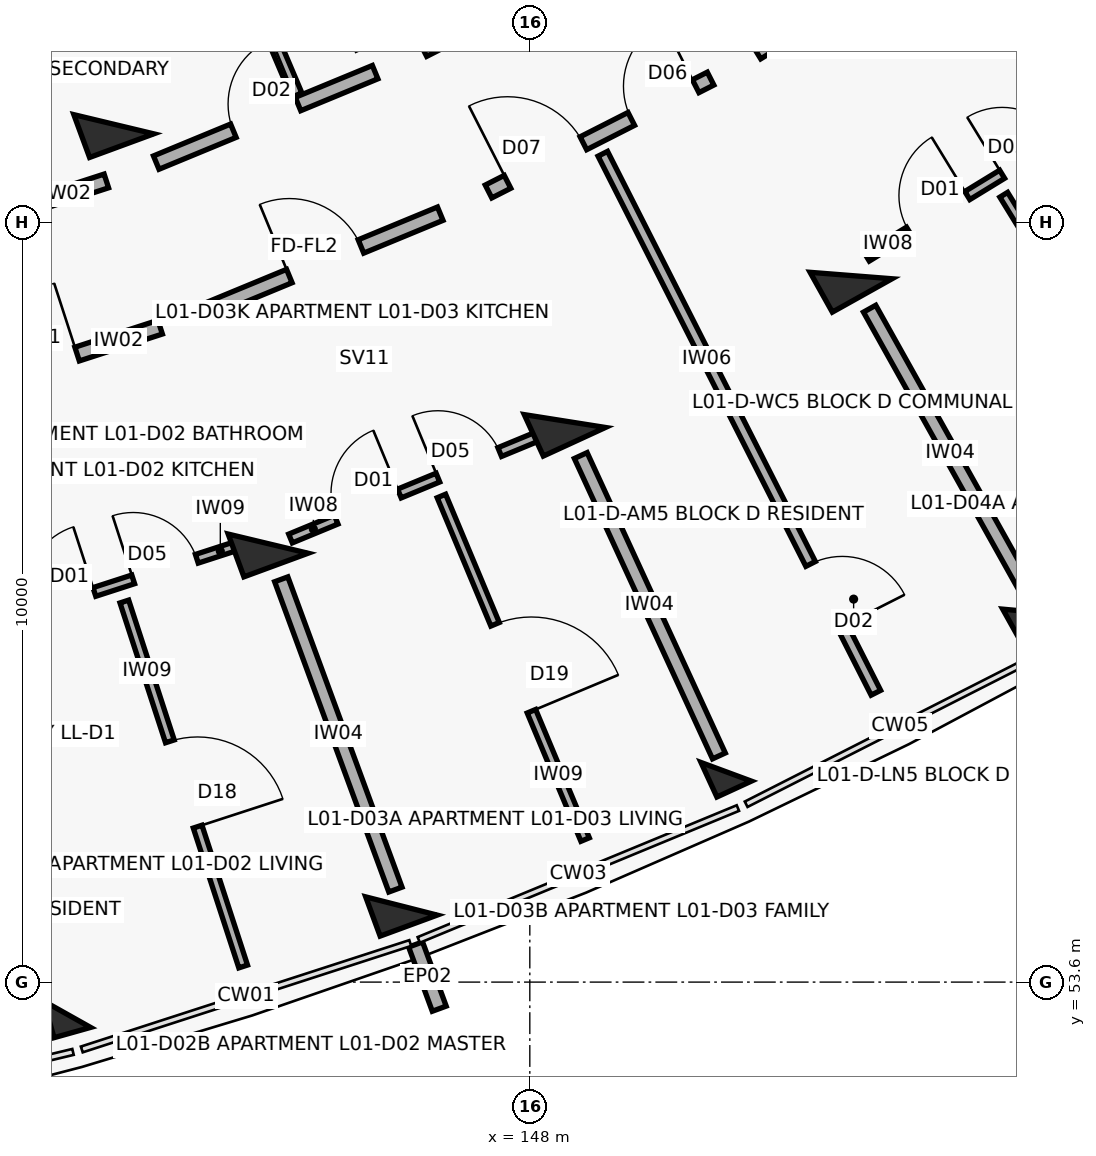
"""IFC4 building model, lengths in metres.
Left out: names, types, materials, properties, quantities, classifications, styles, units other than length and angle.
Written with IfcOpenShell. Run it as: python <this file> out.ifc"""

import sys

from ifc_helpers import new_model, si_unit, direction, frame, frame_2d, origin, origin_2d, place, context, subcontext, project, spatial, rectangle, extrude, element, fill, save


model = new_model("IFC4")
c1 = context("Model", 3, precision=1e-05, world=origin(), true_north=direction((0.0, 1.0)))
c2 = subcontext(c1, "Body", "Model", "MODEL_VIEW")
j1 = project(units=[si_unit("LENGTHUNIT", "METRE"), si_unit("PLANEANGLEUNIT", "RADIAN")], contexts=[c1])
p1 = place(None, origin())
s1 = spatial("IfcSite", under=j1, at=p1, CompositionType="ELEMENT")
p2 = place(p1, origin())
s2 = spatial("IfcBuilding", under=s1, at=p2, CompositionType="ELEMENT")
p3 = place(p2, frame((0.0, 0.0, 4.5)))
s3 = spatial("IfcBuildingStorey", under=s2, at=p3, CompositionType="ELEMENT", Elevation=4.5)
p4 = place(p3, frame((141.913, 53.177, 0.0), z_axis=(0.0, 0.0, 1.0), x_axis=(0.270600445976, -0.962691746426, 0.0)))
e1 = element("IfcColumn", 1, at=p4, inside=s3, PredefinedType="COLUMN", context=c2, shape_type="SweptSolid", body=[
    extrude(rectangle(XDim=0.5, YDim=0.5, at=origin_2d()), origin(), (0.0, 0.0, 1.0), 3.6),
])
for number, where, z_axis, x_axis in (
    (2, (142.527, 64.887, 0.0), (0.0, 0.0, 1.0), (0.345, -0.938, 0.0)),
    (3, (144.557, 59.369, 0.0), (0.0, 0.0, 1.0), (0.345, -0.938, 0.0)),
):
    element("IfcColumn", number, at=place(p3, frame(where, z_axis=z_axis, x_axis=x_axis)), inside=s3, PredefinedType="COLUMN", context=c2, shape_type="SweptSolid", body=[
        extrude(rectangle(XDim=0.6, YDim=0.9, at=origin_2d()), origin(), (0.0, 0.0, 1.0), 3.6),
    ])
p5 = place(p3, frame((146.311, 54.602, 0.0), z_axis=(0.0, 0.0, 1.0), x_axis=(0.345298198999, -0.93849302276, 0.0)))
e4 = element("IfcColumn", 4, at=p5, inside=s3, PredefinedType="COLUMN", context=c2, shape_type="SweptSolid", body=[
    extrude(rectangle(XDim=0.55, YDim=0.8, at=origin_2d()), origin(), (0.0, 0.0, 1.0), 3.6),
])
p6 = place(p3, frame((148.461, 60.982, 0.0), z_axis=(0.0, 0.0, 1.0), x_axis=(0.417867073801, -0.908508177527, 0.0)))
e5 = element("IfcColumn", 5, at=p6, inside=s3, PredefinedType="COLUMN", context=c2, shape_type="SweptSolid", body=[
    extrude(rectangle(XDim=0.6, YDim=0.9, at=origin_2d()), origin(), (0.0, 0.0, 1.0), 3.6),
])
p7 = place(p3, frame((150.584, 56.367, 0.0), z_axis=(0.0, 0.0, 1.0), x_axis=(0.417867073801, -0.908508177527, 0.0)))
e6 = element("IfcColumn", 6, at=p7, inside=s3, PredefinedType="COLUMN", context=c2, shape_type="SweptSolid", body=[
    extrude(rectangle(XDim=0.5, YDim=0.5, at=origin_2d()), origin(), (0.0, 0.0, 1.0), 3.6),
])
p8 = place(p3, frame((152.227, 62.897, 0.0), z_axis=(0.0, 0.0, 1.0), x_axis=(0.487859659139, -0.87292207727, 0.0)))
e7 = element("IfcColumn", 7, at=p8, inside=s3, PredefinedType="COLUMN", context=c2, shape_type="SweptSolid", body=[
    extrude(rectangle(XDim=0.6, YDim=0.9, at=origin_2d()), origin(), (0.0, 0.0, 1.0), 3.6),
])
p9 = place(p3, frame((154.705, 58.462, 0.0), z_axis=(0.0, 0.0, 1.0), x_axis=(0.487859659139, -0.87292207727, 0.0)))
e8 = element("IfcColumn", 8, at=p9, inside=s3, PredefinedType="COLUMN", context=c2, shape_type="SweptSolid", body=[
    extrude(rectangle(XDim=0.55, YDim=0.8, at=origin_2d()), origin(), (0.0, 0.0, 1.0), 3.6),
])
p10 = place(p3, frame((146.498, 54.095, 0.0), z_axis=(0.0, 0.0, 1.0), x_axis=(0.34529052391, -0.938495846607, 0.0)))
e9 = element("IfcWall", 9, at=p10, inside=s3, PredefinedType="PARAPET", context=c2, shape_type="SweptSolid", body=[
    extrude(rectangle(XDim=0.9, YDim=0.195, at=frame_2d((0.45, 0.0))), origin(), (0.0, 0.0, 1.0), 2.6),
])
p11 = place(p3, frame((140.019, 61.208, 0.0), z_axis=(0.0, 0.0, 1.0), x_axis=(0.951323803878, 0.308193154005, 0.0)))
e10 = element("IfcWall", 10, at=p11, inside=s3, PredefinedType="SOLIDWALL", context=c2, shape_type="SweptSolid", body=[
    extrude(rectangle(XDim=3.277, YDim=0.19, at=frame_2d((1.639, 0.0))), origin(), (0.0, 0.0, 1.0), 2.58),
])
p12 = place(p11, frame((1.148, 0.0, 0.0)))
e11 = element("IfcOpeningElement", 11, at=p12, cuts=e10, PredefinedType="OPENING", context=c2, shape_type="SweptSolid", body=[
    extrude(rectangle(XDim=0.98, YDim=2.15, at=frame_2d((0.49, 1.075))), frame((0.0, 0.105, 0.0), z_axis=(0.0, -1.0, 0.0), x_axis=(1.0, 0.0, 0.0)), (0.0, 0.0, 1.0), 0.21),
])
p13 = place(p3, frame((139.464, 63.181, 0.0), z_axis=(0.0, 0.0, 1.0), x_axis=(0.951336474448, 0.308154040027, 0.0)))
e12 = element("IfcWall", 12, at=p13, inside=s3, PredefinedType="SOLIDWALL", context=c2, shape_type="SweptSolid", body=[
    extrude(rectangle(XDim=3.116, YDim=0.19, at=frame_2d((1.558, 0.0))), origin(), (0.0, 0.0, 1.0), 2.58),
])
p14 = place(p13, frame((1.108, 0.0, 0.0)))
e13 = element("IfcOpeningElement", 13, at=p14, cuts=e12, PredefinedType="OPENING", context=c2, shape_type="SweptSolid", body=[
    extrude(rectangle(XDim=0.9, YDim=2.1, at=frame_2d((0.45, 1.05))), frame((0.0, 0.105, 0.0), z_axis=(0.0, -1.0, 0.0), x_axis=(1.0, 0.0, 0.0)), (0.0, 0.0, 1.0), 0.21),
])
p15 = place(p3, frame((140.797, 58.256, 0.0), z_axis=(0.0, 0.0, 1.0), x_axis=(0.951329312261, 0.308176150331, 0.0)))
e14 = element("IfcWall", 14, at=p15, inside=s3, PredefinedType="PARTITIONING", context=c2, shape_type="SweptSolid", body=[
    extrude(rectangle(XDim=3.616, YDim=0.12, at=frame_2d((1.808, 0.0))), origin(), (0.0, 0.0, 1.0), 2.58),
])
p16 = place(p15, frame((0.65, 0.0, 0.0)))
e15 = element("IfcOpeningElement", 15, at=p16, cuts=e14, PredefinedType="OPENING", context=c2, shape_type="SweptSolid", body=[
    extrude(rectangle(XDim=0.9, YDim=2.1, at=frame_2d((0.45, 1.05))), frame((0.0, 0.07, 0.0), z_axis=(0.0, -1.0, 0.0), x_axis=(1.0, 0.0, 0.0)), (0.0, 0.0, 1.0), 0.14),
])
p17 = place(p15, frame((2.086, 0.0, 0.0)))
e16 = element("IfcOpeningElement", 16, at=p17, cuts=e14, PredefinedType="OPENING", context=c2, shape_type="SweptSolid", body=[
    extrude(rectangle(XDim=0.88, YDim=2.1, at=frame_2d((0.44, 1.05))), frame((0.0, 0.07, 0.0), z_axis=(0.0, -1.0, 0.0), x_axis=(1.0, 0.0, 0.0)), (0.0, 0.0, 1.0), 0.14),
])
p18 = place(p3, frame((142.665, 58.608, 0.0), z_axis=(0.0, 0.0, 1.0), x_axis=(0.309592146544, -0.950869445717, 0.0)))
e17 = element("IfcWall", 17, at=p18, inside=s3, PredefinedType="PARTITIONING", context=c2, shape_type="SweptSolid", body=[
    extrude(rectangle(XDim=5.05, YDim=0.12, at=frame_2d((2.525, 0.0))), origin(), (0.0, 0.0, 1.0), 2.58),
])
p19 = place(p18, frame((1.935, 0.0, 0.0)))
e18 = element("IfcOpeningElement", 18, at=p19, cuts=e17, PredefinedType="OPENING", context=c2, shape_type="SweptSolid", body=[
    extrude(rectangle(XDim=1.18, YDim=2.1, at=frame_2d((0.59, 1.05))), frame((0.0, 0.07, 0.0), z_axis=(0.0, -1.0, 0.0), x_axis=(1.0, 0.0, 0.0)), (0.0, 0.0, 1.0), 0.14),
])
p20 = place(p3, frame((143.793, 62.459, 0.0), z_axis=(0.0, 0.0, 1.0), x_axis=(0.924214561665, 0.381873596896, 0.0)))
e19 = element("IfcWall", 19, at=p20, inside=s3, PredefinedType="SOLIDWALL", context=c2, shape_type="SweptSolid", body=[
    extrude(rectangle(XDim=3.277, YDim=0.19, at=frame_2d((1.639, 0.0))), origin(), (0.0, 0.0, 1.0), 2.58),
])
p21 = place(p20, frame((1.128, 0.0, 0.0)))
e20 = element("IfcOpeningElement", 20, at=p21, cuts=e19, PredefinedType="OPENING", context=c2, shape_type="SweptSolid", body=[
    extrude(rectangle(XDim=1.02, YDim=2.15, at=frame_2d((0.51, 1.075))), frame((0.0, 0.105, 0.0), z_axis=(0.0, -1.0, 0.0), x_axis=(1.0, 0.0, 0.0)), (0.0, 0.0, 1.0), 0.21),
])
p22 = place(p3, frame((143.085, 64.383, 0.0), z_axis=(0.0, 0.0, 1.0), x_axis=(0.924213340202, 0.381876553081, 0.0)))
e21 = element("IfcWall", 21, at=p22, inside=s3, PredefinedType="SOLIDWALL", context=c2, shape_type="SweptSolid", body=[
    extrude(rectangle(XDim=3.116, YDim=0.19, at=frame_2d((1.558, 0.0))), origin(), (0.0, 0.0, 1.0), 2.58),
])
p23 = place(p22, frame((1.098, 0.0, 0.0)))
e22 = element("IfcOpeningElement", 22, at=p23, cuts=e21, PredefinedType="OPENING", context=c2, shape_type="SweptSolid", body=[
    extrude(rectangle(XDim=0.92, YDim=2.1, at=frame_2d((0.46, 1.05))), frame((0.0, 0.105, 0.0), z_axis=(0.0, -1.0, 0.0), x_axis=(1.0, 0.0, 0.0)), (0.0, 0.0, 1.0), 0.21),
])
p24 = place(p3, frame((143.643, 68.308, 0.0), z_axis=(0.0, 0.0, 1.0), x_axis=(0.391203300693, -0.920304285292, 0.0)))
e23 = element("IfcWall", 23, at=p24, inside=s3, PredefinedType="PARTITIONING", context=c2, shape_type="SweptSolid", body=[
    extrude(rectangle(XDim=3.3, YDim=0.145, at=frame_2d((1.65, 0.0))), origin(), (0.0, 0.0, 1.0), 2.58),
])
p25 = place(p24, frame((1.21, 0.0, 0.0)))
e24 = element("IfcOpeningElement", 24, at=p25, cuts=e23, PredefinedType="OPENING", context=c2, shape_type="SweptSolid", body=[
    extrude(rectangle(XDim=0.88, YDim=2.1, at=frame_2d((0.44, 1.05))), frame((0.0, 0.083, 0.0), z_axis=(0.0, -1.0, 0.0), x_axis=(1.0, 0.0, 0.0)), (0.0, 0.0, 1.0), 0.165),
])
p26 = place(p3, frame((144.852, 59.437, 0.0), z_axis=(0.0, 0.0, 1.0), x_axis=(0.924217547919, 0.381866369453, 0.0)))
e25 = element("IfcWall", 25, at=p26, inside=s3, PredefinedType="PARTITIONING", context=c2, shape_type="SweptSolid", body=[
    extrude(rectangle(XDim=3.628, YDim=0.125, at=frame_2d((1.814, 0.0))), origin(), (0.0, 0.0, 1.0), 2.58),
])
p27 = place(p26, frame((0.65, 0.0, 0.0)))
e26 = element("IfcOpeningElement", 26, at=p27, cuts=e25, PredefinedType="OPENING", context=c2, shape_type="SweptSolid", body=[
    extrude(rectangle(XDim=0.9, YDim=2.1, at=frame_2d((0.45, 1.05))), frame((0.0, 0.073, 0.0), z_axis=(0.0, -1.0, 0.0), x_axis=(1.0, 0.0, 0.0)), (0.0, 0.0, 1.0), 0.145),
])
p28 = place(p26, frame((2.098, 0.0, 0.0)))
e27 = element("IfcOpeningElement", 27, at=p28, cuts=e25, PredefinedType="OPENING", context=c2, shape_type="SweptSolid", body=[
    extrude(rectangle(XDim=0.88, YDim=2.1, at=frame_2d((0.44, 1.05))), frame((0.0, 0.073, 0.0), z_axis=(0.0, -1.0, 0.0), x_axis=(1.0, 0.0, 0.0)), (0.0, 0.0, 1.0), 0.145),
])
p29 = place(p3, frame((146.837, 59.996, 0.0), z_axis=(0.0, 0.0, 1.0), x_axis=(0.385846225752, -0.922563108992, 0.0)))
e28 = element("IfcWall", 28, at=p29, inside=s3, PredefinedType="PARTITIONING", context=c2, shape_type="SweptSolid", body=[
    extrude(rectangle(XDim=4.9, YDim=0.12, at=frame_2d((2.45, 0.0))), origin(), (0.0, 0.0, 1.0), 2.58),
])
p30 = place(p29, frame((1.83, 0.0, 0.0)))
e29 = element("IfcOpeningElement", 29, at=p30, cuts=e28, PredefinedType="OPENING", context=c2, shape_type="SweptSolid", body=[
    extrude(rectangle(XDim=1.24, YDim=2.1, at=frame_2d((0.62, 1.05))), frame((0.0, 0.07, 0.0), z_axis=(0.0, -1.0, 0.0), x_axis=(1.0, 0.0, 0.0)), (0.0, 0.0, 1.0), 0.14),
])
p31 = place(p3, frame((144.73, 58.9, 0.0), z_axis=(0.0, 0.0, 1.0), x_axis=(0.345273579683, -0.938502080537, 0.0)))
e30 = element("IfcWall", 30, at=p31, inside=s3, PredefinedType="SOLIDWALL", context=c2, shape_type="SweptSolid", body=[
    extrude(rectangle(XDim=4.35, YDim=0.185, at=frame_2d((2.175, 0.0))), origin(), (0.0, 0.0, 1.0), 2.58),
])
p32 = place(p3, frame((147.457, 64.003, 0.0), z_axis=(0.0, 0.0, 1.0), x_axis=(0.891412167565, 0.45319349898, 0.0)))
e31 = element("IfcWall", 31, at=p32, inside=s3, PredefinedType="SOLIDWALL", context=c2, shape_type="SweptSolid", body=[
    extrude(rectangle(XDim=3.277, YDim=0.19, at=frame_2d((1.639, 0.0))), origin(), (0.0, 0.0, 1.0), 2.58),
])
p33 = place(p32, frame((0.28, 0.0, 0.0)))
e32 = element("IfcOpeningElement", 32, at=p33, cuts=e31, PredefinedType="OPENING", context=c2, shape_type="SweptSolid", body=[
    extrude(rectangle(XDim=1.12, YDim=2.15, at=frame_2d((0.56, 1.075))), frame((0.0, 0.105, 0.0), z_axis=(0.0, -1.0, 0.0), x_axis=(1.0, 0.0, 0.0)), (0.0, 0.0, 1.0), 0.21),
])
p34 = place(p32, frame((2.107, 0.0, 0.0)))
e33 = element("IfcOpeningElement", 33, at=p34, cuts=e31, PredefinedType="OPENING", context=c2, shape_type="SweptSolid", body=[
    extrude(rectangle(XDim=0.95, YDim=2.1, at=frame_2d((0.475, 1.05))), frame((0.0, 0.105, 0.0), z_axis=(0.0, -1.0, 0.0), x_axis=(1.0, 0.0, 0.0)), (0.0, 0.0, 1.0), 0.21),
])
p35 = place(p3, frame((146.6, 65.865, 0.0), z_axis=(0.0, 0.0, 1.0), x_axis=(0.891414101388, 0.453189695212, 0.0)))
e34 = element("IfcWall", 34, at=p35, inside=s3, PredefinedType="SOLIDWALL", context=c2, shape_type="SweptSolid", body=[
    extrude(rectangle(XDim=3.116, YDim=0.19, at=frame_2d((1.558, 0.0))), origin(), (0.0, 0.0, 1.0), 2.58),
])
p36 = place(p35, frame((1.088, 0.0, 0.0)))
e35 = element("IfcOpeningElement", 35, at=p36, cuts=e34, PredefinedType="OPENING", context=c2, shape_type="SweptSolid", body=[
    extrude(rectangle(XDim=0.94, YDim=2.1, at=frame_2d((0.47, 1.05))), frame((0.0, 0.105, 0.0), z_axis=(0.0, -1.0, 0.0), x_axis=(1.0, 0.0, 0.0)), (0.0, 0.0, 1.0), 0.21),
])
p37 = place(p3, frame((148.96, 64.499, 0.0), z_axis=(0.0, 0.0, 1.0), x_axis=(0.451912010816, -0.892062517137, 0.0)))
e36 = element("IfcWall", 36, at=p37, inside=s3, PredefinedType="PARTITIONING", context=c2, shape_type="SweptSolid", body=[
    extrude(rectangle(XDim=7.95, YDim=0.14, at=frame_2d((3.975, 0.0))), origin(), (0.0, 0.0, 1.0), 2.58),
])
p38 = place(p37, frame((6.05, 0.0, 0.0)))
e37 = element("IfcOpeningElement", 37, at=p38, cuts=e36, PredefinedType="OPENING", context=c2, shape_type="SweptSolid", body=[
    extrude(rectangle(XDim=0.92, YDim=2.1, at=frame_2d((0.46, 1.05))), frame((0.0, 0.08, 0.0), z_axis=(0.0, -1.0, 0.0), x_axis=(1.0, 0.0, 0.0)), (0.0, 0.0, 1.0), 0.16),
])
p39 = place(p3, frame((148.67, 60.528, 0.0), z_axis=(0.0, 0.0, 1.0), x_axis=(0.417837051164, -0.908521985796, 0.0)))
e38 = element("IfcWall", 38, at=p39, inside=s3, PredefinedType="SOLIDWALL", context=c2, shape_type="SweptSolid", body=[
    extrude(rectangle(XDim=4.35, YDim=0.185, at=frame_2d((2.175, 0.0))), origin(), (0.0, 0.0, 1.0), 2.58),
])
p40 = place(p3, frame((150.989, 65.829, 0.0), z_axis=(0.0, 0.0, 1.0), x_axis=(0.853090237845, 0.521763400492, 0.0)))
e39 = element("IfcWall", 39, at=p40, inside=s3, PredefinedType="SOLIDWALL", context=c2, shape_type="SweptSolid", body=[
    extrude(rectangle(XDim=3.277, YDim=0.19, at=frame_2d((1.638, 0.0))), origin(), (0.0, 0.0, 1.0), 2.58),
])
p41 = place(p40, frame((1.128, 0.0, 0.0)))
e40 = element("IfcOpeningElement", 40, at=p41, cuts=e39, PredefinedType="OPENING", context=c2, shape_type="SweptSolid", body=[
    extrude(rectangle(XDim=1.02, YDim=2.15, at=frame_2d((0.51, 1.075))), frame((0.0, 0.105, 0.0), z_axis=(0.0, -1.0, 0.0), x_axis=(1.0, 0.0, 0.0)), (0.0, 0.0, 1.0), 0.21),
])
p42 = place(p3, frame((152.434, 63.141, 0.0), z_axis=(0.0, 0.0, 1.0), x_axis=(0.853089873067, 0.521763996909, 0.0)))
e41 = element("IfcWall", 41, at=p42, inside=s3, PredefinedType="PARTITIONING", context=c2, shape_type="SweptSolid", body=[
    extrude(rectangle(XDim=3.616, YDim=0.125, at=frame_2d((1.808, 0.0))), origin(), (0.0, 0.0, 1.0), 2.58),
])
p43 = place(p42, frame((0.65, 0.0, 0.0)))
e42 = element("IfcOpeningElement", 42, at=p43, cuts=e41, PredefinedType="OPENING", context=c2, shape_type="SweptSolid", body=[
    extrude(rectangle(XDim=0.9, YDim=2.1, at=frame_2d((0.45, 1.05))), frame((0.0, 0.073, 0.0), z_axis=(0.0, -1.0, 0.0), x_axis=(1.0, 0.0, 0.0)), (0.0, 0.0, 1.0), 0.145),
])
p44 = place(p42, frame((2.086, 0.0, 0.0)))
e43 = element("IfcOpeningElement", 43, at=p44, cuts=e41, PredefinedType="OPENING", context=c2, shape_type="SweptSolid", body=[
    extrude(rectangle(XDim=0.88, YDim=2.1, at=frame_2d((0.44, 1.05))), frame((0.0, 0.073, 0.0), z_axis=(0.0, -1.0, 0.0), x_axis=(1.0, 0.0, 0.0)), (0.0, 0.0, 1.0), 0.145),
])
p45 = place(p3, frame((154.235, 63.96, 0.0), z_axis=(0.0, 0.0, 1.0), x_axis=(0.524202618281, -0.851593573829, 0.0)))
e44 = element("IfcWall", 44, at=p45, inside=s3, PredefinedType="PARTITIONING", context=c2, shape_type="SweptSolid", body=[
    extrude(rectangle(XDim=5.05, YDim=0.12, at=frame_2d((2.525, 0.0))), origin(), (0.0, 0.0, 1.0), 2.58),
])
p46 = place(p45, frame((2.075, 0.0, 0.0)))
e45 = element("IfcOpeningElement", 45, at=p46, cuts=e44, PredefinedType="OPENING", context=c2, shape_type="SweptSolid", body=[
    extrude(rectangle(XDim=0.9, YDim=2.1, at=frame_2d((0.45, 1.05))), frame((0.0, 0.07, 0.0), z_axis=(0.0, -1.0, 0.0), x_axis=(1.0, 0.0, 0.0)), (0.0, 0.0, 1.0), 0.14),
])
p47 = place(p3, frame((152.471, 62.46, 0.0), z_axis=(0.0, 0.0, 1.0), x_axis=(0.487866639184, -0.872918176218, 0.0)))
e46 = element("IfcWall", 46, at=p47, inside=s3, PredefinedType="SOLIDWALL", context=c2, shape_type="SweptSolid", body=[
    extrude(rectangle(XDim=4.35, YDim=0.185, at=frame_2d((2.175, 0.0))), origin(), (0.0, 0.0, 1.0), 2.58),
])
p48 = place(p12, origin())
e47 = element("IfcDoor", 47, at=p48, inside=s3, OperationType="SINGLE_SWING_RIGHT", PredefinedType="DOOR", context=c2, shape_type="SweptSolid", body=[
    extrude(rectangle(XDim=0.98, YDim=2.15, at=frame_2d((0.49, 1.075))), frame((0.0, 0.025, 0.0), z_axis=(0.0, -1.0, 0.0), x_axis=(1.0, 0.0, 0.0)), (0.0, 0.0, 1.0), 0.05),
])
fill(e11, e47)
p49 = place(p16, origin())
e48 = element("IfcDoor", 48, at=p49, inside=s3, OperationType="SINGLE_SWING_RIGHT", PredefinedType="DOOR", context=c2, shape_type="SweptSolid", body=[
    extrude(rectangle(XDim=0.9, YDim=2.1, at=frame_2d((0.45, 1.05))), frame((0.0, 0.025, 0.0), z_axis=(0.0, -1.0, 0.0), x_axis=(1.0, 0.0, 0.0)), (0.0, 0.0, 1.0), 0.05),
])
fill(e15, e48)
p50 = place(p17, origin())
e49 = element("IfcDoor", 49, at=p50, inside=s3, OperationType="SINGLE_SWING_LEFT", PredefinedType="DOOR", context=c2, shape_type="SweptSolid", body=[
    extrude(rectangle(XDim=0.88, YDim=2.1, at=frame_2d((0.44, 1.05))), frame((0.0, 0.025, 0.0), z_axis=(0.0, -1.0, 0.0), x_axis=(1.0, 0.0, 0.0)), (0.0, 0.0, 1.0), 0.05),
])
fill(e16, e49)
p51 = place(p19, origin())
e50 = element("IfcDoor", 50, at=p51, inside=s3, OperationType="SINGLE_SWING_RIGHT", PredefinedType="DOOR", context=c2, shape_type="SweptSolid", body=[
    extrude(rectangle(XDim=1.18, YDim=2.1, at=frame_2d((0.59, 1.05))), frame((0.0, 0.025, 0.0), z_axis=(0.0, -1.0, 0.0), x_axis=(1.0, 0.0, 0.0)), (0.0, 0.0, 1.0), 0.05),
])
fill(e18, e50)
p52 = place(p21, origin())
e51 = element("IfcDoor", 51, at=p52, inside=s3, OperationType="SINGLE_SWING_LEFT", PredefinedType="DOOR", context=c2, shape_type="SweptSolid", body=[
    extrude(rectangle(XDim=1.02, YDim=2.15, at=frame_2d((0.51, 1.075))), frame((0.0, 0.025, 0.0), z_axis=(0.0, -1.0, 0.0), x_axis=(1.0, 0.0, 0.0)), (0.0, 0.0, 1.0), 0.05),
])
fill(e20, e51)
p53 = place(p23, origin())
e52 = element("IfcDoor", 52, at=p53, inside=s3, OperationType="SINGLE_SWING_RIGHT", PredefinedType="DOOR", context=c2, shape_type="SweptSolid", body=[
    extrude(rectangle(XDim=0.92, YDim=2.1, at=frame_2d((0.46, 1.05))), frame((0.0, 0.025, 0.0), z_axis=(0.0, -1.0, 0.0), x_axis=(1.0, 0.0, 0.0)), (0.0, 0.0, 1.0), 0.05),
])
fill(e22, e52)
p54 = place(p27, origin())
e53 = element("IfcDoor", 53, at=p54, inside=s3, OperationType="SINGLE_SWING_RIGHT", PredefinedType="DOOR", context=c2, shape_type="SweptSolid", body=[
    extrude(rectangle(XDim=0.9, YDim=2.1, at=frame_2d((0.45, 1.05))), frame((0.0, 0.025, 0.0), z_axis=(0.0, -1.0, 0.0), x_axis=(1.0, 0.0, 0.0)), (0.0, 0.0, 1.0), 0.05),
])
fill(e26, e53)
p55 = place(p28, origin())
e54 = element("IfcDoor", 54, at=p55, inside=s3, OperationType="SINGLE_SWING_LEFT", PredefinedType="DOOR", context=c2, shape_type="SweptSolid", body=[
    extrude(rectangle(XDim=0.88, YDim=2.1, at=frame_2d((0.44, 1.05))), frame((0.0, 0.025, 0.0), z_axis=(0.0, -1.0, 0.0), x_axis=(1.0, 0.0, 0.0)), (0.0, 0.0, 1.0), 0.05),
])
fill(e27, e54)
p56 = place(p30, origin())
e55 = element("IfcDoor", 55, at=p56, inside=s3, OperationType="SINGLE_SWING_RIGHT", PredefinedType="DOOR", context=c2, shape_type="SweptSolid", body=[
    extrude(rectangle(XDim=1.24, YDim=2.1, at=frame_2d((0.62, 1.05))), frame((0.0, 0.025, 0.0), z_axis=(0.0, -1.0, 0.0), x_axis=(1.0, 0.0, 0.0)), (0.0, 0.0, 1.0), 0.05),
])
fill(e29, e55)
p57 = place(p33, origin())
e56 = element("IfcDoor", 56, at=p57, inside=s3, OperationType="SINGLE_SWING_LEFT", PredefinedType="DOOR", context=c2, shape_type="SweptSolid", body=[
    extrude(rectangle(XDim=1.12, YDim=2.15, at=frame_2d((0.56, 1.075))), frame((0.0, 0.025, 0.0), z_axis=(0.0, -1.0, 0.0), x_axis=(1.0, 0.0, 0.0)), (0.0, 0.0, 1.0), 0.05),
])
fill(e32, e56)
p58 = place(p34, origin())
e57 = element("IfcDoor", 57, at=p58, inside=s3, OperationType="SINGLE_SWING_RIGHT", PredefinedType="DOOR", context=c2, shape_type="SweptSolid", body=[
    extrude(rectangle(XDim=0.95, YDim=2.1, at=frame_2d((0.475, 1.05))), frame((0.0, 0.025, 0.0), z_axis=(0.0, -1.0, 0.0), x_axis=(1.0, 0.0, 0.0)), (0.0, 0.0, 1.0), 0.05),
])
fill(e33, e57)
p59 = place(p38, origin())
e58 = element("IfcDoor", 58, at=p59, inside=s3, OperationType="SINGLE_SWING_RIGHT", PredefinedType="DOOR", context=c2, shape_type="SweptSolid", body=[
    extrude(rectangle(XDim=0.92, YDim=2.1, at=frame_2d((0.46, 1.05))), frame((0.0, 0.025, 0.0), z_axis=(0.0, -1.0, 0.0), x_axis=(1.0, 0.0, 0.0)), (0.0, 0.0, 1.0), 0.05),
])
fill(e37, e58)
p60 = place(p43, origin())
e59 = element("IfcDoor", 59, at=p60, inside=s3, OperationType="SINGLE_SWING_RIGHT", PredefinedType="DOOR", context=c2, shape_type="SweptSolid", body=[
    extrude(rectangle(XDim=0.9, YDim=2.1, at=frame_2d((0.45, 1.05))), frame((0.0, 0.025, 0.0), z_axis=(0.0, -1.0, 0.0), x_axis=(1.0, 0.0, 0.0)), (0.0, 0.0, 1.0), 0.05),
])
fill(e42, e59)
p61 = place(p44, origin())
e60 = element("IfcDoor", 60, at=p61, inside=s3, OperationType="SINGLE_SWING_LEFT", PredefinedType="DOOR", context=c2, shape_type="SweptSolid", body=[
    extrude(rectangle(XDim=0.88, YDim=2.1, at=frame_2d((0.44, 1.05))), frame((0.0, 0.025, 0.0), z_axis=(0.0, -1.0, 0.0), x_axis=(1.0, 0.0, 0.0)), (0.0, 0.0, 1.0), 0.05),
])
fill(e43, e60)
save(model, sys.argv[1])
